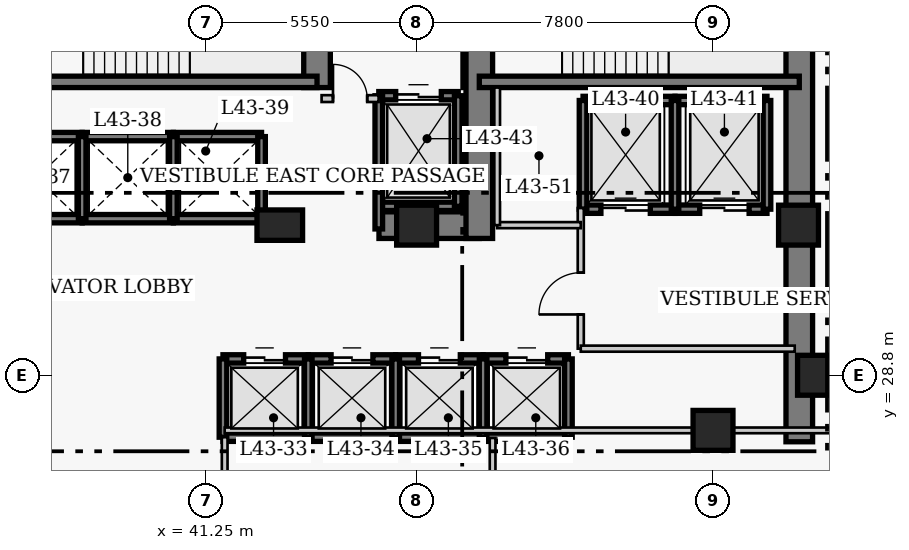
"""IFC4 building model, lengths in metres.
Left out: names, types, materials, properties, quantities, classifications, styles, units other than length and angle.
Written with IfcOpenShell. Run it as: python <this file> out.ifc"""

import sys

from ifc_helpers import new_model, si_unit, direction, frame, frame_2d, origin, origin_2d, place, context, subcontext, project, spatial, rectangle, extrude, element, fill, save


model = new_model("IFC4")
c1 = context("Model", 3, precision=1e-05, world=origin(), true_north=direction((0.0, 1.0)))
c2 = subcontext(c1, "Body", "Model", "MODEL_VIEW")
j1 = project(units=[si_unit("LENGTHUNIT", "METRE"), si_unit("PLANEANGLEUNIT", "RADIAN")], contexts=[c1])
p1 = place(None, origin())
s1 = spatial("IfcSite", under=j1, at=p1, CompositionType="ELEMENT")
p2 = place(p1, origin())
s2 = spatial("IfcBuilding", under=s1, at=p2, CompositionType="ELEMENT")
p3 = place(p2, frame((0.0, 0.0, 172.6)))
s3 = spatial("IfcBuildingStorey", under=s2, at=p3, CompositionType="ELEMENT", Elevation=172.6)
p4 = place(p3, frame((56.87, 27.05, 0.0), z_axis=(0.0, 0.0, 1.0), x_axis=(0.0, 1.0, 0.0)))
e1 = element("IfcWall", 1, at=p4, inside=s3, PredefinedType="SHEAR", context=c2, shape_type="SweptSolid", body=[
    extrude(rectangle(XDim=13.62, YDim=0.7, at=frame_2d((6.81, 0.0))), origin(), (0.0, 0.0, 1.0), 3.8),
])
p5 = place(p3, frame((45.81, 32.75, 0.0), z_axis=(0.0, 0.0, 1.0), x_axis=(1.0, 0.0, 0.0)))
e2 = element("IfcWall", 2, at=p5, inside=s3, PredefinedType="SHEAR", context=c2, shape_type="SweptSolid", body=[
    extrude(rectangle(XDim=2.64, YDim=0.7, at=frame_2d((1.32, 0.0))), origin(), (0.0, 0.0, 1.0), 3.8),
])
p6 = place(p3, frame((44.18, 36.37, 0.0), z_axis=(0.0, 0.0, 1.0), x_axis=(0.0, 1.0, 0.0)))
e3 = element("IfcWall", 3, at=p6, inside=s3, PredefinedType="SHEAR", context=c2, shape_type="SweptSolid", body=[
    extrude(rectangle(XDim=3.95, YDim=0.7, at=frame_2d((1.975, 0.0))), origin(), (0.0, 0.0, 1.0), 3.8),
])
p7 = place(p3, frame((48.45, 32.4, 0.0), z_axis=(0.0, 0.0, 1.0), x_axis=(0.0, 1.0, 0.0)))
e4 = element("IfcWall", 4, at=p7, inside=s3, PredefinedType="SHEAR", context=c2, shape_type="SweptSolid", body=[
    extrude(rectangle(XDim=7.92, YDim=0.7, at=frame_2d((3.96, 0.0))), origin(), (0.0, 0.0, 1.0), 3.8),
])
p8 = place(p7, frame((5.8, 0.0, 0.0)))
e5 = element("IfcOpeningElement", 5, at=p8, cuts=e4, PredefinedType="OPENING", context=c2, shape_type="SweptSolid", body=[
    extrude(rectangle(XDim=1.1, YDim=2.15, at=frame_2d((0.55, 1.075))), frame((0.0, 0.36, 0.0), z_axis=(0.0, -1.0, 0.0), x_axis=(1.0, 0.0, 0.0)), (0.0, 0.0, 1.0), 0.72),
])
p9 = place(p3, frame((35.85, 36.52, 0.0), z_axis=(0.0, 0.0, 1.0), x_axis=(1.0, 0.0, 0.0)))
e6 = element("IfcWall", 6, at=p9, inside=s3, PredefinedType="SHEAR", context=c2, shape_type="SweptSolid", body=[
    extrude(rectangle(XDim=8.33, YDim=0.3, at=frame_2d((4.165, 0.0))), origin(), (0.0, 0.0, 1.0), 3.8),
])
p10 = place(p3, frame((48.45, 36.52, 0.0), z_axis=(0.0, 0.0, 1.0), x_axis=(1.0, 0.0, 0.0)))
e7 = element("IfcWall", 7, at=p10, inside=s3, PredefinedType="SHEAR", context=c2, shape_type="SweptSolid", body=[
    extrude(rectangle(XDim=8.42, YDim=0.3, at=frame_2d((4.21, 0.0))), origin(), (0.0, 0.0, 1.0), 3.8),
])
p11 = place(p3, frame((57.35, 28.8, 0.0), z_axis=(0.0, 0.0, 1.0), x_axis=(1.0, 0.0, 0.0)))
e8 = element("IfcColumn", 8, at=p11, inside=s3, PredefinedType="COLUMN", context=c2, shape_type="SweptSolid", body=[
    extrude(rectangle(XDim=1.05, YDim=1.05, at=origin_2d()), origin(), (0.0, 0.0, 1.0), 3.8),
])
p12 = place(p3, frame((43.2, 32.75, 0.0), z_axis=(0.0, 0.0, 1.0), x_axis=(1.0, 0.0, 0.0)))
e9 = element("IfcColumn", 9, at=p12, inside=s3, PredefinedType="COLUMN", context=c2, shape_type="SweptSolid", body=[
    extrude(rectangle(XDim=1.2, YDim=0.8, at=origin_2d()), origin(), (0.0, 0.0, 1.0), 3.8),
])
for number, where, z_axis, x_axis in (
    (10, (46.8, 32.75, 0.0), (0.0, 0.0, 1.0), (1.0, 0.0, 0.0)),
    (11, (54.6, 27.35, 0.0), (0.0, 0.0, 1.0), (1.0, 0.0, 0.0)),
    (12, (56.85, 32.75, 0.0), (0.0, 0.0, 1.0), (1.0, 0.0, 0.0)),
):
    element("IfcColumn", number, at=place(p3, frame(where, z_axis=z_axis, x_axis=x_axis)), inside=s3, PredefinedType="COLUMN", context=c2, shape_type="SweptSolid", body=[
        extrude(rectangle(XDim=1.05, YDim=1.05, at=origin_2d()), origin(), (0.0, 0.0, 1.0), 3.8),
    ])
p13 = place(p3, frame((41.705, 29.23, 0.0), z_axis=(0.0, 0.0, 1.0), x_axis=(1.0, 0.0, 0.0)))
e13 = element("IfcWall", 13, at=p13, inside=s3, PredefinedType="SHEAR", context=c2, shape_type="SweptSolid", body=[
    extrude(rectangle(XDim=2.245, YDim=0.22, at=frame_2d((1.123, 0.0))), origin(), (0.0, 0.0, 1.0), 3.8),
])
p14 = place(p13, frame((0.545, 0.0, 0.0)))
e14 = element("IfcOpeningElement", 14, at=p14, cuts=e13, PredefinedType="OPENING", context=c2, shape_type="SweptSolid", body=[
    extrude(rectangle(XDim=1.1, YDim=2.15, at=frame_2d((0.55, 1.075))), frame((0.0, 0.12, 0.0), z_axis=(0.0, -1.0, 0.0), x_axis=(1.0, 0.0, 0.0)), (0.0, 0.0, 1.0), 0.24),
])
p15 = place(p3, frame((41.705, 27.17, 0.0), z_axis=(0.0, 0.0, 1.0), x_axis=(1.0, 0.0, 0.0)))
e15 = element("IfcWall", 15, at=p15, inside=s3, PredefinedType="SHEAR", context=c2, shape_type="SweptSolid", body=[
    extrude(rectangle(XDim=2.245, YDim=0.22, at=frame_2d((1.123, 0.0))), origin(), (0.0, 0.0, 1.0), 3.8),
])
p16 = place(p3, frame((41.705, 27.17, 0.0), z_axis=(0.0, 0.0, 1.0), x_axis=(0.0, 1.0, 0.0)))
e16 = element("IfcWall", 16, at=p16, inside=s3, PredefinedType="SHEAR", context=c2, shape_type="SweptSolid", body=[
    extrude(rectangle(XDim=2.06, YDim=0.2, at=frame_2d((1.03, 0.0))), origin(), (0.0, 0.0, 1.0), 3.8),
])
p17 = place(p3, frame((43.95, 29.23, 0.0), z_axis=(0.0, 0.0, 1.0), x_axis=(1.0, 0.0, 0.0)))
e17 = element("IfcWall", 17, at=p17, inside=s3, PredefinedType="SHEAR", context=c2, shape_type="SweptSolid", body=[
    extrude(rectangle(XDim=2.3, YDim=0.22, at=frame_2d((1.15, 0.0))), origin(), (0.0, 0.0, 1.0), 3.8),
])
p18 = place(p17, frame((0.6, 0.0, 0.0)))
e18 = element("IfcOpeningElement", 18, at=p18, cuts=e17, PredefinedType="OPENING", context=c2, shape_type="SweptSolid", body=[
    extrude(rectangle(XDim=1.1, YDim=2.15, at=frame_2d((0.55, 1.075))), frame((0.0, 0.12, 0.0), z_axis=(0.0, -1.0, 0.0), x_axis=(1.0, 0.0, 0.0)), (0.0, 0.0, 1.0), 0.24),
])
p19 = place(p3, frame((43.95, 27.17, 0.0), z_axis=(0.0, 0.0, 1.0), x_axis=(1.0, 0.0, 0.0)))
e19 = element("IfcWall", 19, at=p19, inside=s3, PredefinedType="SHEAR", context=c2, shape_type="SweptSolid", body=[
    extrude(rectangle(XDim=2.3, YDim=0.22, at=frame_2d((1.15, 0.0))), origin(), (0.0, 0.0, 1.0), 3.8),
])
p20 = place(p3, frame((43.95, 27.17, 0.0), z_axis=(0.0, 0.0, 1.0), x_axis=(0.0, 1.0, 0.0)))
e20 = element("IfcWall", 20, at=p20, inside=s3, PredefinedType="SHEAR", context=c2, shape_type="SweptSolid", body=[
    extrude(rectangle(XDim=2.06, YDim=0.2, at=frame_2d((1.03, 0.0))), origin(), (0.0, 0.0, 1.0), 3.8),
])
p21 = place(p3, frame((46.25, 29.23, 0.0), z_axis=(0.0, 0.0, 1.0), x_axis=(1.0, 0.0, 0.0)))
e21 = element("IfcWall", 21, at=p21, inside=s3, PredefinedType="SHEAR", context=c2, shape_type="SweptSolid", body=[
    extrude(rectangle(XDim=2.3, YDim=0.22, at=frame_2d((1.15, 0.0))), origin(), (0.0, 0.0, 1.0), 3.8),
])
p22 = place(p21, frame((0.6, 0.0, 0.0)))
e22 = element("IfcOpeningElement", 22, at=p22, cuts=e21, PredefinedType="OPENING", context=c2, shape_type="SweptSolid", body=[
    extrude(rectangle(XDim=1.1, YDim=2.15, at=frame_2d((0.55, 1.075))), frame((0.0, 0.12, 0.0), z_axis=(0.0, -1.0, 0.0), x_axis=(1.0, 0.0, 0.0)), (0.0, 0.0, 1.0), 0.24),
])
p23 = place(p3, frame((46.25, 27.17, 0.0), z_axis=(0.0, 0.0, 1.0), x_axis=(1.0, 0.0, 0.0)))
e23 = element("IfcWall", 23, at=p23, inside=s3, PredefinedType="SHEAR", context=c2, shape_type="SweptSolid", body=[
    extrude(rectangle(XDim=2.3, YDim=0.22, at=frame_2d((1.15, 0.0))), origin(), (0.0, 0.0, 1.0), 3.8),
])
p24 = place(p3, frame((46.25, 27.17, 0.0), z_axis=(0.0, 0.0, 1.0), x_axis=(0.0, 1.0, 0.0)))
e24 = element("IfcWall", 24, at=p24, inside=s3, PredefinedType="SHEAR", context=c2, shape_type="SweptSolid", body=[
    extrude(rectangle(XDim=2.06, YDim=0.2, at=frame_2d((1.03, 0.0))), origin(), (0.0, 0.0, 1.0), 3.8),
])
p25 = place(p3, frame((48.55, 29.23, 0.0), z_axis=(0.0, 0.0, 1.0), x_axis=(1.0, 0.0, 0.0)))
e25 = element("IfcWall", 25, at=p25, inside=s3, PredefinedType="SHEAR", context=c2, shape_type="SweptSolid", body=[
    extrude(rectangle(XDim=2.245, YDim=0.22, at=frame_2d((1.123, 0.0))), origin(), (0.0, 0.0, 1.0), 3.8),
])
p26 = place(p25, frame((0.6, 0.0, 0.0)))
e26 = element("IfcOpeningElement", 26, at=p26, cuts=e25, PredefinedType="OPENING", context=c2, shape_type="SweptSolid", body=[
    extrude(rectangle(XDim=1.1, YDim=2.15, at=frame_2d((0.55, 1.075))), frame((0.0, 0.12, 0.0), z_axis=(0.0, -1.0, 0.0), x_axis=(1.0, 0.0, 0.0)), (0.0, 0.0, 1.0), 0.24),
])
p27 = place(p3, frame((48.55, 27.17, 0.0), z_axis=(0.0, 0.0, 1.0), x_axis=(1.0, 0.0, 0.0)))
e27 = element("IfcWall", 27, at=p27, inside=s3, PredefinedType="SHEAR", context=c2, shape_type="SweptSolid", body=[
    extrude(rectangle(XDim=2.245, YDim=0.22, at=frame_2d((1.123, 0.0))), origin(), (0.0, 0.0, 1.0), 3.8),
])
for number, where, z_axis, x_axis in (
    (28, (48.55, 27.17, 0.0), (0.0, 0.0, 1.0), (0.0, 1.0, 0.0)),
    (29, (50.795, 27.17, 0.0), (0.0, 0.0, 1.0), (0.0, 1.0, 0.0)),
):
    element("IfcWall", number, at=place(p3, frame(where, z_axis=z_axis, x_axis=x_axis)), inside=s3, PredefinedType="SHEAR", context=c2, shape_type="SweptSolid", body=[
        extrude(rectangle(XDim=2.06, YDim=0.2, at=frame_2d((1.03, 0.0))), origin(), (0.0, 0.0, 1.0), 3.8),
    ])
for number, where, z_axis, x_axis in (
    (30, (35.68, 35.08, 0.0), (0.0, 0.0, 1.0), (1.0, 0.0, 0.0)),
    (31, (35.68, 32.92, 0.0), (0.0, 0.0, 1.0), (1.0, 0.0, 0.0)),
):
    element("IfcWall", number, at=place(p3, frame(where, z_axis=z_axis, x_axis=x_axis)), inside=s3, PredefinedType="SHEAR", context=c2, shape_type="SweptSolid", body=[
        extrude(rectangle(XDim=2.32, YDim=0.22, at=frame_2d((1.16, 0.0))), origin(), (0.0, 0.0, 1.0), 3.8),
    ])
for number, where, z_axis, x_axis in (
    (32, (38.0, 35.08, 0.0), (0.0, 0.0, 1.0), (1.0, 0.0, 0.0)),
    (33, (38.0, 32.92, 0.0), (0.0, 0.0, 1.0), (1.0, 0.0, 0.0)),
):
    element("IfcWall", number, at=place(p3, frame(where, z_axis=z_axis, x_axis=x_axis)), inside=s3, PredefinedType="SHEAR", context=c2, shape_type="SweptSolid", body=[
        extrude(rectangle(XDim=2.4, YDim=0.22, at=frame_2d((1.2, 0.0))), origin(), (0.0, 0.0, 1.0), 3.8),
    ])
p28 = place(p3, frame((38.0, 32.92, 0.0), z_axis=(0.0, 0.0, 1.0), x_axis=(0.0, 1.0, 0.0)))
e34 = element("IfcWall", 34, at=p28, inside=s3, PredefinedType="SHEAR", context=c2, shape_type="SweptSolid", body=[
    extrude(rectangle(XDim=2.16, YDim=0.2, at=frame_2d((1.08, 0.0))), origin(), (0.0, 0.0, 1.0), 3.8),
])
for number, where, z_axis, x_axis in (
    (35, (40.4, 35.08, 0.0), (0.0, 0.0, 1.0), (1.0, 0.0, 0.0)),
    (36, (40.4, 32.92, 0.0), (0.0, 0.0, 1.0), (1.0, 0.0, 0.0)),
):
    element("IfcWall", number, at=place(p3, frame(where, z_axis=z_axis, x_axis=x_axis)), inside=s3, PredefinedType="SHEAR", context=c2, shape_type="SweptSolid", body=[
        extrude(rectangle(XDim=2.32, YDim=0.22, at=frame_2d((1.16, 0.0))), origin(), (0.0, 0.0, 1.0), 3.8),
    ])
for number, where, z_axis, x_axis in (
    (37, (40.4, 32.92, 0.0), (0.0, 0.0, 1.0), (0.0, 1.0, 0.0)),
    (38, (42.72, 32.92, 0.0), (0.0, 0.0, 1.0), (0.0, 1.0, 0.0)),
):
    element("IfcWall", number, at=place(p3, frame(where, z_axis=z_axis, x_axis=x_axis)), inside=s3, PredefinedType="SHEAR", context=c2, shape_type="SweptSolid", body=[
        extrude(rectangle(XDim=2.16, YDim=0.2, at=frame_2d((1.08, 0.0))), origin(), (0.0, 0.0, 1.0), 3.8),
    ])
p29 = place(p3, frame((51.18, 36.03, 0.0), z_axis=(0.0, 0.0, 1.0), x_axis=(1.0, 0.0, 0.0)))
e39 = element("IfcWall", 39, at=p29, inside=s3, PredefinedType="SHEAR", context=c2, shape_type="SweptSolid", body=[
    extrude(rectangle(XDim=2.42, YDim=0.22, at=frame_2d((1.21, 0.0))), origin(), (0.0, 0.0, 1.0), 3.8),
])
p30 = place(p3, frame((51.18, 33.17, 0.0), z_axis=(0.0, 0.0, 1.0), x_axis=(1.0, 0.0, 0.0)))
e40 = element("IfcWall", 40, at=p30, inside=s3, PredefinedType="SHEAR", context=c2, shape_type="SweptSolid", body=[
    extrude(rectangle(XDim=2.42, YDim=0.22, at=frame_2d((1.21, 0.0))), origin(), (0.0, 0.0, 1.0), 3.8),
])
p31 = place(p30, frame((0.47, 0.0, 0.0)))
e41 = element("IfcOpeningElement", 41, at=p31, cuts=e40, PredefinedType="OPENING", context=c2, shape_type="SweptSolid", body=[
    extrude(rectangle(XDim=1.3, YDim=2.15, at=frame_2d((0.65, 1.075))), frame((0.0, 0.12, 0.0), z_axis=(0.0, -1.0, 0.0), x_axis=(1.0, 0.0, 0.0)), (0.0, 0.0, 1.0), 0.24),
])
p32 = place(p3, frame((51.18, 33.17, 0.0), z_axis=(0.0, 0.0, 1.0), x_axis=(0.0, 1.0, 0.0)))
e42 = element("IfcWall", 42, at=p32, inside=s3, PredefinedType="SHEAR", context=c2, shape_type="SweptSolid", body=[
    extrude(rectangle(XDim=2.86, YDim=0.2, at=frame_2d((1.43, 0.0))), origin(), (0.0, 0.0, 1.0), 3.8),
])
p33 = place(p3, frame((53.6, 36.03, 0.0), z_axis=(0.0, 0.0, 1.0), x_axis=(1.0, 0.0, 0.0)))
e43 = element("IfcWall", 43, at=p33, inside=s3, PredefinedType="SHEAR", context=c2, shape_type="SweptSolid", body=[
    extrude(rectangle(XDim=2.42, YDim=0.22, at=frame_2d((1.21, 0.0))), origin(), (0.0, 0.0, 1.0), 3.8),
])
p34 = place(p3, frame((53.6, 33.17, 0.0), z_axis=(0.0, 0.0, 1.0), x_axis=(1.0, 0.0, 0.0)))
e44 = element("IfcWall", 44, at=p34, inside=s3, PredefinedType="SHEAR", context=c2, shape_type="SweptSolid", body=[
    extrude(rectangle(XDim=2.42, YDim=0.22, at=frame_2d((1.21, 0.0))), origin(), (0.0, 0.0, 1.0), 3.8),
])
p35 = place(p34, frame((0.65, 0.0, 0.0)))
e45 = element("IfcOpeningElement", 45, at=p35, cuts=e44, PredefinedType="OPENING", context=c2, shape_type="SweptSolid", body=[
    extrude(rectangle(XDim=1.3, YDim=2.15, at=frame_2d((0.65, 1.075))), frame((0.0, 0.12, 0.0), z_axis=(0.0, -1.0, 0.0), x_axis=(1.0, 0.0, 0.0)), (0.0, 0.0, 1.0), 0.24),
])
for number, where, z_axis, x_axis in (
    (46, (53.6, 33.17, 0.0), (0.0, 0.0, 1.0), (0.0, 1.0, 0.0)),
    (47, (56.02, 33.17, 0.0), (0.0, 0.0, 1.0), (0.0, 1.0, 0.0)),
):
    element("IfcWall", number, at=place(p3, frame(where, z_axis=z_axis, x_axis=x_axis)), inside=s3, PredefinedType="SHEAR", context=c2, shape_type="SweptSolid", body=[
        extrude(rectangle(XDim=2.86, YDim=0.2, at=frame_2d((1.43, 0.0))), origin(), (0.0, 0.0, 1.0), 3.8),
    ])
p36 = place(p3, frame((45.805, 36.155, 0.0), z_axis=(0.0, 0.0, 1.0), x_axis=(1.0, 0.0, 0.0)))
e48 = element("IfcWall", 48, at=p36, inside=s3, PredefinedType="SHEAR", context=c2, shape_type="SweptSolid", body=[
    extrude(rectangle(XDim=2.09, YDim=0.22, at=frame_2d((1.045, 0.0))), origin(), (0.0, 0.0, 1.0), 3.8),
])
p37 = place(p36, frame((0.445, 0.0, 0.0)))
e49 = element("IfcOpeningElement", 49, at=p37, cuts=e48, PredefinedType="OPENING", context=c2, shape_type="SweptSolid", body=[
    extrude(rectangle(XDim=1.2, YDim=2.15, at=frame_2d((0.6, 1.075))), frame((0.0, 0.12, 0.0), z_axis=(0.0, -1.0, 0.0), x_axis=(1.0, 0.0, 0.0)), (0.0, 0.0, 1.0), 0.24),
])
p38 = place(p3, frame((45.805, 33.245, 0.0), z_axis=(0.0, 0.0, 1.0), x_axis=(1.0, 0.0, 0.0)))
e50 = element("IfcWall", 50, at=p38, inside=s3, PredefinedType="SHEAR", context=c2, shape_type="SweptSolid", body=[
    extrude(rectangle(XDim=2.09, YDim=0.22, at=frame_2d((1.045, 0.0))), origin(), (0.0, 0.0, 1.0), 3.8),
])
p39 = place(p3, frame((45.805, 32.65, 0.0), z_axis=(0.0, 0.0, 1.0), x_axis=(0.0, 1.0, 0.0)))
e51 = element("IfcWall", 51, at=p39, inside=s3, PredefinedType="SHEAR", context=c2, shape_type="SweptSolid", body=[
    extrude(rectangle(XDim=3.505, YDim=0.2, at=frame_2d((1.752, 0.0))), origin(), (0.0, 0.0, 1.0), 3.8),
])
p40 = place(p3, frame((47.895, 33.245, 0.0), z_axis=(0.0, 0.0, 1.0), x_axis=(0.0, 1.0, 0.0)))
e52 = element("IfcWall", 52, at=p40, inside=s3, PredefinedType="SHEAR", context=c2, shape_type="SweptSolid", body=[
    extrude(rectangle(XDim=2.91, YDim=0.2, at=frame_2d((1.455, 0.0))), origin(), (0.0, 0.0, 1.0), 3.8),
])
p41 = place(p3, frame((44.3, 36.08, 0.0), z_axis=(0.0, 0.0, 1.0), x_axis=(1.0, 0.0, 0.0)))
e53 = element("IfcWall", 53, at=p41, inside=s3, PredefinedType="PARTITIONING", context=c2, shape_type="SweptSolid", body=[
    extrude(rectangle(XDim=1.5, YDim=0.18, at=frame_2d((0.75, 0.0))), origin(), (0.0, 0.0, 1.0), 3.55),
])
p42 = place(p41, frame((0.3, 0.0, 0.0)))
e54 = element("IfcOpeningElement", 54, at=p42, cuts=e53, PredefinedType="OPENING", context=c2, shape_type="SweptSolid", body=[
    extrude(rectangle(XDim=0.9, YDim=2.15, at=frame_2d((0.45, 1.075))), frame((0.0, 0.1, 0.0), z_axis=(0.0, -1.0, 0.0), x_axis=(1.0, 0.0, 0.0)), (0.0, 0.0, 1.0), 0.2),
])
p43 = place(p3, frame((51.12, 29.5, 0.0), z_axis=(0.0, 0.0, 1.0), x_axis=(0.0, 1.0, 0.0)))
e55 = element("IfcWall", 55, at=p43, inside=s3, PredefinedType="PARTITIONING", context=c2, shape_type="SweptSolid", body=[
    extrude(rectangle(XDim=3.7, YDim=0.16, at=frame_2d((1.85, 0.0))), origin(), (0.0, 0.0, 1.0), 3.55),
])
p44 = place(p43, frame((0.9, 0.0, 0.0)))
e56 = element("IfcOpeningElement", 56, at=p44, cuts=e55, PredefinedType="OPENING", context=c2, shape_type="SweptSolid", body=[
    extrude(rectangle(XDim=1.1, YDim=2.15, at=frame_2d((0.55, 1.075))), frame((0.0, 0.09, 0.0), z_axis=(0.0, -1.0, 0.0), x_axis=(1.0, 0.0, 0.0)), (0.0, 0.0, 1.0), 0.18),
])
p45 = place(p3, frame((51.12, 29.5, 0.0), z_axis=(0.0, 0.0, 1.0), x_axis=(1.0, 0.0, 0.0)))
e57 = element("IfcWall", 57, at=p45, inside=s3, PredefinedType="PARTITIONING", context=c2, shape_type="SweptSolid", body=[
    extrude(rectangle(XDim=5.63, YDim=0.16, at=frame_2d((2.815, 0.0))), origin(), (0.0, 0.0, 1.0), 3.55),
])
p46 = place(p3, frame((48.92, 32.75, 0.0), z_axis=(0.0, 0.0, 1.0), x_axis=(1.0, 0.0, 0.0)))
e58 = element("IfcWall", 58, at=p46, inside=s3, PredefinedType="PARTITIONING", context=c2, shape_type="SweptSolid", body=[
    extrude(rectangle(XDim=2.2, YDim=0.16, at=frame_2d((1.1, 0.0))), origin(), (0.0, 0.0, 1.0), 3.55),
])
p47 = place(p3, frame((48.92, 32.75, 0.0), z_axis=(0.0, 0.0, 1.0), x_axis=(0.0, 1.0, 0.0)))
e59 = element("IfcWall", 59, at=p47, inside=s3, PredefinedType="PARTITIONING", context=c2, shape_type="SweptSolid", body=[
    extrude(rectangle(XDim=3.62, YDim=0.15, at=frame_2d((1.81, 0.0))), origin(), (0.0, 0.0, 1.0), 3.55),
])
p48 = place(p3, frame((41.75, 19.16, 0.0), z_axis=(0.0, 0.0, 1.0), x_axis=(0.0, 1.0, 0.0)))
e60 = element("IfcWall", 60, at=p48, inside=s3, PredefinedType="PARTITIONING", context=c2, shape_type="SweptSolid", body=[
    extrude(rectangle(XDim=8.01, YDim=0.15, at=frame_2d((4.005, 0.0))), origin(), (0.0, 0.0, 1.0), 3.55),
])
p49 = place(p3, frame((48.8, 19.16, 0.0), z_axis=(0.0, 0.0, 1.0), x_axis=(0.0, 1.0, 0.0)))
e61 = element("IfcWall", 61, at=p49, inside=s3, PredefinedType="PARTITIONING", context=c2, shape_type="SweptSolid", body=[
    extrude(rectangle(XDim=7.99, YDim=0.15, at=frame_2d((3.995, 0.0))), origin(), (0.0, 0.0, 1.0), 3.55),
])
p50 = place(p3, frame((41.75, 27.35, 0.0), z_axis=(0.0, 0.0, 1.0), x_axis=(1.0, 0.0, 0.0)))
e62 = element("IfcWall", 62, at=p50, inside=s3, PredefinedType="PARTITIONING", context=c2, shape_type="SweptSolid", body=[
    extrude(rectangle(XDim=17.04, YDim=0.15, at=frame_2d((8.52, 0.0))), origin(), (0.0, 0.0, 1.0), 3.55),
])
p51 = place(p14, origin())
e63 = element("IfcDoor", 63, at=p51, inside=s3, OperationType="DOUBLE_DOOR_SLIDING", PredefinedType="DOOR", context=c2, shape_type="SweptSolid", body=[
    extrude(rectangle(XDim=1.1, YDim=2.15, at=frame_2d((0.55, 1.075))), frame((0.0, 0.025, 0.0), z_axis=(0.0, -1.0, 0.0), x_axis=(1.0, 0.0, 0.0)), (0.0, 0.0, 1.0), 0.05),
])
fill(e14, e63)
p52 = place(p18, origin())
e64 = element("IfcDoor", 64, at=p52, inside=s3, OperationType="DOUBLE_DOOR_SLIDING", PredefinedType="DOOR", context=c2, shape_type="SweptSolid", body=[
    extrude(rectangle(XDim=1.1, YDim=2.15, at=frame_2d((0.55, 1.075))), frame((0.0, 0.025, 0.0), z_axis=(0.0, -1.0, 0.0), x_axis=(1.0, 0.0, 0.0)), (0.0, 0.0, 1.0), 0.05),
])
fill(e18, e64)
p53 = place(p22, origin())
e65 = element("IfcDoor", 65, at=p53, inside=s3, OperationType="DOUBLE_DOOR_SLIDING", PredefinedType="DOOR", context=c2, shape_type="SweptSolid", body=[
    extrude(rectangle(XDim=1.1, YDim=2.15, at=frame_2d((0.55, 1.075))), frame((0.0, 0.025, 0.0), z_axis=(0.0, -1.0, 0.0), x_axis=(1.0, 0.0, 0.0)), (0.0, 0.0, 1.0), 0.05),
])
fill(e22, e65)
p54 = place(p26, origin())
e66 = element("IfcDoor", 66, at=p54, inside=s3, OperationType="DOUBLE_DOOR_SLIDING", PredefinedType="DOOR", context=c2, shape_type="SweptSolid", body=[
    extrude(rectangle(XDim=1.1, YDim=2.15, at=frame_2d((0.55, 1.075))), frame((0.0, 0.025, 0.0), z_axis=(0.0, -1.0, 0.0), x_axis=(1.0, 0.0, 0.0)), (0.0, 0.0, 1.0), 0.05),
])
fill(e26, e66)
p55 = place(p31, origin())
e67 = element("IfcDoor", 67, at=p55, inside=s3, OperationType="DOUBLE_DOOR_SLIDING", PredefinedType="DOOR", context=c2, shape_type="SweptSolid", body=[
    extrude(rectangle(XDim=1.3, YDim=2.15, at=frame_2d((0.65, 1.075))), frame((0.0, 0.025, 0.0), z_axis=(0.0, -1.0, 0.0), x_axis=(1.0, 0.0, 0.0)), (0.0, 0.0, 1.0), 0.05),
])
fill(e41, e67)
p56 = place(p35, origin())
e68 = element("IfcDoor", 68, at=p56, inside=s3, OperationType="DOUBLE_DOOR_SLIDING", PredefinedType="DOOR", context=c2, shape_type="SweptSolid", body=[
    extrude(rectangle(XDim=1.3, YDim=2.15, at=frame_2d((0.65, 1.075))), frame((0.0, 0.025, 0.0), z_axis=(0.0, -1.0, 0.0), x_axis=(1.0, 0.0, 0.0)), (0.0, 0.0, 1.0), 0.05),
])
fill(e45, e68)
p57 = place(p37, origin())
e69 = element("IfcDoor", 69, at=p57, inside=s3, OperationType="DOUBLE_DOOR_SLIDING", PredefinedType="DOOR", context=c2, shape_type="SweptSolid", body=[
    extrude(rectangle(XDim=1.2, YDim=2.15, at=frame_2d((0.6, 1.075))), frame((0.0, 0.025, 0.0), z_axis=(0.0, -1.0, 0.0), x_axis=(1.0, 0.0, 0.0)), (0.0, 0.0, 1.0), 0.05),
])
fill(e49, e69)
p58 = place(p42, origin())
e70 = element("IfcDoor", 70, at=p58, inside=s3, OperationType="SINGLE_SWING_LEFT", PredefinedType="DOOR", context=c2, shape_type="SweptSolid", body=[
    extrude(rectangle(XDim=0.9, YDim=2.15, at=frame_2d((0.45, 1.075))), frame((0.0, 0.025, 0.0), z_axis=(0.0, -1.0, 0.0), x_axis=(1.0, 0.0, 0.0)), (0.0, 0.0, 1.0), 0.05),
])
fill(e54, e70)
p59 = place(p44, origin())
e71 = element("IfcDoor", 71, at=p59, inside=s3, OperationType="SINGLE_SWING_LEFT", PredefinedType="DOOR", context=c2, shape_type="SweptSolid", body=[
    extrude(rectangle(XDim=1.1, YDim=2.15, at=frame_2d((0.55, 1.075))), frame((0.0, 0.025, 0.0), z_axis=(0.0, -1.0, 0.0), x_axis=(1.0, 0.0, 0.0)), (0.0, 0.0, 1.0), 0.05),
])
fill(e56, e71)
save(model, sys.argv[1])
